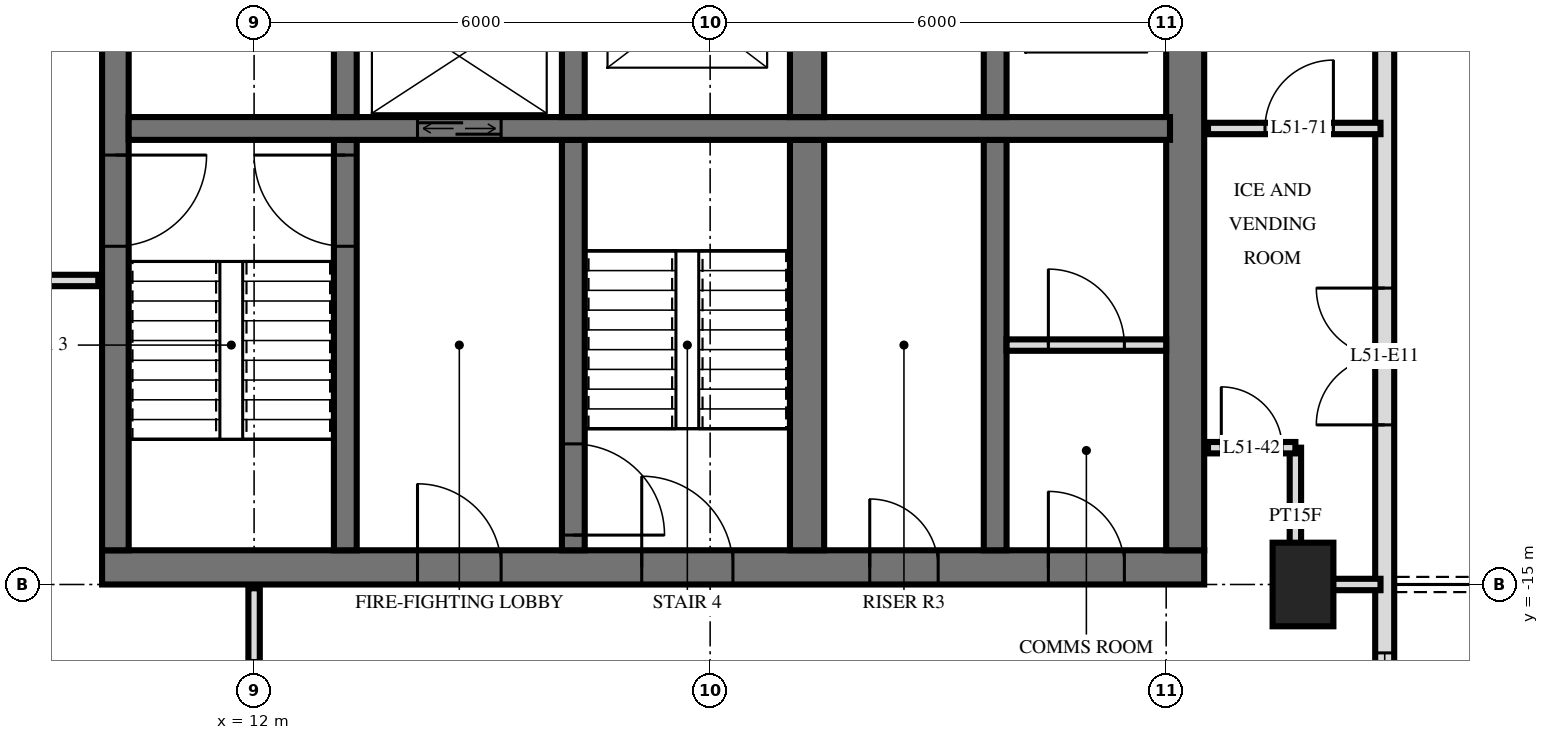
"""IFC4 building model, lengths in metres.
Left out: names, types, materials, properties, quantities, classifications, styles, units other than length and angle.
Written with IfcOpenShell. Run it as: python <this file> out.ifc"""

import sys

from ifc_helpers import new_model, si_unit, direction, frame, frame_2d, origin, origin_2d, place, context, subcontext, project, spatial, rectangle, extrude, element, fill, save


model = new_model("IFC4")
c1 = context("Model", 3, precision=1e-05, world=origin(), true_north=direction((0.0, 1.0)))
c2 = subcontext(c1, "Body", "Model", "MODEL_VIEW")
j1 = project(units=[si_unit("LENGTHUNIT", "METRE"), si_unit("PLANEANGLEUNIT", "RADIAN")], contexts=[c1])
p1 = place(None, origin())
s1 = spatial("IfcSite", under=j1, at=p1, CompositionType="ELEMENT")
p2 = place(p1, origin())
s2 = spatial("IfcBuilding", under=s1, at=p2, CompositionType="ELEMENT")
p3 = place(p2, frame((0.0, 0.0, 197.6)))
s3 = spatial("IfcBuildingStorey", under=s2, at=p3, CompositionType="ELEMENT", Elevation=197.6)
p4 = place(p3, frame((25.8, -15.0, 0.0), z_axis=(0.0, 0.0, 1.0), x_axis=(0.0, 1.0, 0.0)))
e1 = element("IfcColumn", 1, at=p4, inside=s3, PredefinedType="COLUMN", context=c2, shape_type="SweptSolid", body=[
    extrude(rectangle(XDim=1.1, YDim=0.8, at=origin_2d()), origin(), (0.0, 0.0, 1.0), 3.5),
])
p5 = place(p3, frame((10.0, -14.775, 0.0), z_axis=(0.0, 0.0, 1.0), x_axis=(1.0, 0.0, 0.0)))
e2 = element("IfcWall", 2, at=p5, inside=s3, PredefinedType="SHEAR", context=c2, shape_type="SweptSolid", body=[
    extrude(rectangle(XDim=14.5, YDim=0.45, at=frame_2d((7.25, 0.0))), origin(), (0.0, 0.0, 1.0), 3.5),
])
p6 = place(p5, frame((7.1, 0.0, 0.0)))
e3 = element("IfcOpeningElement", 3, at=p6, cuts=e2, PredefinedType="OPENING", context=c2, shape_type="SweptSolid", body=[
    extrude(rectangle(XDim=1.2, YDim=2.1, at=frame_2d((0.6, 1.05))), frame((0.0, 0.235, 0.0), z_axis=(0.0, -1.0, 0.0), x_axis=(1.0, 0.0, 0.0)), (0.0, 0.0, 1.0), 0.47),
])
p7 = place(p5, frame((4.15, 0.0, 0.0)))
e4 = element("IfcOpeningElement", 4, at=p7, cuts=e2, PredefinedType="OPENING", context=c2, shape_type="SweptSolid", body=[
    extrude(rectangle(XDim=1.1, YDim=2.1, at=frame_2d((0.55, 1.05))), frame((0.0, 0.235, 0.0), z_axis=(0.0, -1.0, 0.0), x_axis=(1.0, 0.0, 0.0)), (0.0, 0.0, 1.0), 0.47),
])
p8 = place(p5, frame((10.1, 0.0, 0.0)))
e5 = element("IfcOpeningElement", 5, at=p8, cuts=e2, PredefinedType="OPENING", context=c2, shape_type="SweptSolid", body=[
    extrude(rectangle(XDim=0.9, YDim=2.1, at=frame_2d((0.45, 1.05))), frame((0.0, 0.235, 0.0), z_axis=(0.0, -1.0, 0.0), x_axis=(1.0, 0.0, 0.0)), (0.0, 0.0, 1.0), 0.47),
])
p9 = place(p5, frame((12.45, 0.0, 0.0)))
e6 = element("IfcOpeningElement", 6, at=p9, cuts=e2, PredefinedType="OPENING", context=c2, shape_type="SweptSolid", body=[
    extrude(rectangle(XDim=1.0, YDim=2.1, at=frame_2d((0.5, 1.05))), frame((0.0, 0.235, 0.0), z_axis=(0.0, -1.0, 0.0), x_axis=(1.0, 0.0, 0.0)), (0.0, 0.0, 1.0), 0.47),
])
p10 = place(p3, frame((10.175, -14.55, 0.0), z_axis=(0.0, 0.0, 1.0), x_axis=(0.0, 1.0, 0.0)))
e7 = element("IfcWall", 7, at=p10, inside=s3, PredefinedType="SHEAR", context=c2, shape_type="SweptSolid", body=[
    extrude(rectangle(XDim=14.1, YDim=0.35, at=frame_2d((7.05, 0.0))), origin(), (0.0, 0.0, 1.0), 3.5),
])
p11 = place(p10, frame((8.4, 0.0, 0.0)))
e8 = element("IfcOpeningElement", 8, at=p11, cuts=e7, PredefinedType="OPENING", context=c2, shape_type="SweptSolid", body=[
    extrude(rectangle(XDim=1.4, YDim=2.4, at=frame_2d((0.7, 1.2))), frame((0.0, 0.185, 0.0), z_axis=(0.0, -1.0, 0.0), x_axis=(1.0, 0.0, 0.0)), (0.0, 0.0, 1.0), 0.37),
])
p12 = place(p10, frame((10.0, 0.0, 0.0)))
e9 = element("IfcOpeningElement", 9, at=p12, cuts=e7, PredefinedType="OPENING", context=c2, shape_type="SweptSolid", body=[
    extrude(rectangle(XDim=1.4, YDim=2.4, at=frame_2d((0.7, 1.2))), frame((0.0, 0.185, 0.0), z_axis=(0.0, -1.0, 0.0), x_axis=(1.0, 0.0, 0.0)), (0.0, 0.0, 1.0), 0.37),
])
p13 = place(p10, frame((4.0, 0.0, 0.0)))
e10 = element("IfcOpeningElement", 10, at=p13, cuts=e7, PredefinedType="OPENING", context=c2, shape_type="SweptSolid", body=[
    extrude(rectangle(XDim=1.2, YDim=2.1, at=frame_2d((0.6, 1.05))), frame((0.0, 0.185, 0.0), z_axis=(0.0, -1.0, 0.0), x_axis=(1.0, 0.0, 0.0)), (0.0, 0.0, 1.0), 0.37),
])
p14 = place(p3, frame((24.25, -14.55, 0.0), z_axis=(0.0, 0.0, 1.0), x_axis=(0.0, 1.0, 0.0)))
e11 = element("IfcWall", 11, at=p14, inside=s3, PredefinedType="SHEAR", context=c2, shape_type="SweptSolid", body=[
    extrude(rectangle(XDim=14.1, YDim=0.5, at=frame_2d((7.05, 0.0))), origin(), (0.0, 0.0, 1.0), 3.5),
])
p15 = place(p3, frame((10.35, -9.0, 0.0), z_axis=(0.0, 0.0, 1.0), x_axis=(1.0, 0.0, 0.0)))
e12 = element("IfcWall", 12, at=p15, inside=s3, PredefinedType="SHEAR", context=c2, shape_type="SweptSolid", body=[
    extrude(rectangle(XDim=13.7, YDim=0.3, at=frame_2d((6.85, 0.0))), origin(), (0.0, 0.0, 1.0), 3.5),
])
p16 = place(p15, frame((3.8, 0.0, 0.0)))
e13 = element("IfcOpeningElement", 13, at=p16, cuts=e12, PredefinedType="OPENING", context=c2, shape_type="SweptSolid", body=[
    extrude(rectangle(XDim=1.1, YDim=2.1, at=frame_2d((0.55, 1.05))), frame((0.0, 0.16, 0.0), z_axis=(0.0, -1.0, 0.0), x_axis=(1.0, 0.0, 0.0)), (0.0, 0.0, 1.0), 0.32),
])
p17 = place(p3, frame((13.2, -8.85, 0.0), z_axis=(0.0, 0.0, 1.0), x_axis=(0.0, 1.0, 0.0)))
e14 = element("IfcWall", 14, at=p17, inside=s3, PredefinedType="SHEAR", context=c2, shape_type="SweptSolid", body=[
    extrude(rectangle(XDim=2.3, YDim=0.3, at=frame_2d((1.15, 0.0))), origin(), (0.0, 0.0, 1.0), 3.5),
])
p18 = place(p3, frame((13.2, -14.55, 0.0), z_axis=(0.0, 0.0, 1.0), x_axis=(0.0, 1.0, 0.0)))
e15 = element("IfcWall", 15, at=p18, inside=s3, PredefinedType="SHEAR", context=c2, shape_type="SweptSolid", body=[
    extrude(rectangle(XDim=5.4, YDim=0.3, at=frame_2d((2.7, 0.0))), origin(), (0.0, 0.0, 1.0), 3.5),
])
p19 = place(p18, frame((4.0, 0.0, 0.0)))
e16 = element("IfcOpeningElement", 16, at=p19, cuts=e15, PredefinedType="OPENING", context=c2, shape_type="SweptSolid", body=[
    extrude(rectangle(XDim=1.2, YDim=2.1, at=frame_2d((0.6, 1.05))), frame((0.0, 0.16, 0.0), z_axis=(0.0, -1.0, 0.0), x_axis=(1.0, 0.0, 0.0)), (0.0, 0.0, 1.0), 0.32),
])
p20 = place(p3, frame((16.2, -8.85, 0.0), z_axis=(0.0, 0.0, 1.0), x_axis=(0.0, 1.0, 0.0)))
e17 = element("IfcWall", 17, at=p20, inside=s3, PredefinedType="SHEAR", context=c2, shape_type="SweptSolid", body=[
    extrude(rectangle(XDim=2.3, YDim=0.3, at=frame_2d((1.15, 0.0))), origin(), (0.0, 0.0, 1.0), 3.5),
])
p21 = place(p3, frame((16.2, -14.55, 0.0), z_axis=(0.0, 0.0, 1.0), x_axis=(0.0, 1.0, 0.0)))
e18 = element("IfcWall", 18, at=p21, inside=s3, PredefinedType="SHEAR", context=c2, shape_type="SweptSolid", body=[
    extrude(rectangle(XDim=5.4, YDim=0.3, at=frame_2d((2.7, 0.0))), origin(), (0.0, 0.0, 1.0), 3.5),
])
p22 = place(p21, frame((0.2, 0.0, 0.0)))
e19 = element("IfcOpeningElement", 19, at=p22, cuts=e18, PredefinedType="OPENING", context=c2, shape_type="SweptSolid", body=[
    extrude(rectangle(XDim=1.2, YDim=2.1, at=frame_2d((0.6, 1.05))), frame((0.0, 0.16, 0.0), z_axis=(0.0, -1.0, 0.0), x_axis=(1.0, 0.0, 0.0)), (0.0, 0.0, 1.0), 0.32),
])
p23 = place(p3, frame((19.275, -8.85, 0.0), z_axis=(0.0, 0.0, 1.0), x_axis=(0.0, 1.0, 0.0)))
e20 = element("IfcWall", 20, at=p23, inside=s3, PredefinedType="SHEAR", context=c2, shape_type="SweptSolid", body=[
    extrude(rectangle(XDim=2.3, YDim=0.45, at=frame_2d((1.15, 0.0))), origin(), (0.0, 0.0, 1.0), 3.5),
])
p24 = place(p3, frame((19.275, -14.55, 0.0), z_axis=(0.0, 0.0, 1.0), x_axis=(0.0, 1.0, 0.0)))
e21 = element("IfcWall", 21, at=p24, inside=s3, PredefinedType="SHEAR", context=c2, shape_type="SweptSolid", body=[
    extrude(rectangle(XDim=5.4, YDim=0.45, at=frame_2d((2.7, 0.0))), origin(), (0.0, 0.0, 1.0), 3.5),
])
p25 = place(p3, frame((21.75, -8.85, 0.0), z_axis=(0.0, 0.0, 1.0), x_axis=(0.0, 1.0, 0.0)))
e22 = element("IfcWall", 22, at=p25, inside=s3, PredefinedType="SHEAR", context=c2, shape_type="SweptSolid", body=[
    extrude(rectangle(XDim=2.3, YDim=0.3, at=frame_2d((1.15, 0.0))), origin(), (0.0, 0.0, 1.0), 3.5),
])
p26 = place(p3, frame((21.75, -14.55, 0.0), z_axis=(0.0, 0.0, 1.0), x_axis=(0.0, 1.0, 0.0)))
e23 = element("IfcWall", 23, at=p26, inside=s3, PredefinedType="SHEAR", context=c2, shape_type="SweptSolid", body=[
    extrude(rectangle(XDim=5.4, YDim=0.3, at=frame_2d((2.7, 0.0))), origin(), (0.0, 0.0, 1.0), 3.5),
])
p27 = place(p3, frame((26.875, -24.875, 0.0), z_axis=(0.0, 0.0, 1.0), x_axis=(0.0, 1.0, 0.0)))
e24 = element("IfcWall", 24, at=p27, inside=s3, PredefinedType="SOLIDWALL", context=c2, shape_type="SweptSolid", body=[
    extrude(rectangle(XDim=21.551, YDim=0.25, at=frame_2d((10.775, 0.0))), origin(), (0.0, 0.0, 1.0), 3.22),
])
p28 = place(p27, frame((0.425, 0.0, 0.0)))
e25 = element("IfcOpeningElement", 25, at=p28, cuts=e24, PredefinedType="OPENING", context=c2, shape_type="SweptSolid", body=[
    extrude(rectangle(XDim=1.8, YDim=2.4, at=frame_2d((0.9, 1.2))), frame((0.0, 0.135, 0.0), z_axis=(0.0, -1.0, 0.0), x_axis=(1.0, 0.0, 0.0)), (0.0, 0.0, 1.0), 0.27),
])
p29 = place(p27, frame((3.875, 0.0, 0.0)))
e26 = element("IfcOpeningElement", 26, at=p29, cuts=e24, PredefinedType="OPENING", context=c2, shape_type="SweptSolid", body=[
    extrude(rectangle(XDim=1.8, YDim=2.4, at=frame_2d((0.9, 1.2))), frame((0.0, 0.135, 0.0), z_axis=(0.0, -1.0, 0.0), x_axis=(1.0, 0.0, 0.0)), (0.0, 0.0, 1.0), 0.27),
])
p30 = place(p27, frame((7.775, 0.0, 0.9)))
e27 = element("IfcOpeningElement", 27, at=p30, cuts=e24, PredefinedType="OPENING", context=c2, shape_type="SweptSolid", body=[
    extrude(rectangle(XDim=1.2, YDim=1.5, at=frame_2d((0.6, 0.75))), frame((0.0, 0.135, 0.0), z_axis=(0.0, -1.0, 0.0), x_axis=(1.0, 0.0, 0.0)), (0.0, 0.0, 1.0), 0.27),
])
p31 = place(p27, frame((11.975, 0.0, 0.0)))
e28 = element("IfcOpeningElement", 28, at=p31, cuts=e24, PredefinedType="OPENING", context=c2, shape_type="SweptSolid", body=[
    extrude(rectangle(XDim=1.8, YDim=2.4, at=frame_2d((0.9, 1.2))), frame((0.0, 0.135, 0.0), z_axis=(0.0, -1.0, 0.0), x_axis=(1.0, 0.0, 0.0)), (0.0, 0.0, 1.0), 0.27),
])
p32 = place(p3, frame((21.9, -11.85, 0.0), z_axis=(0.0, 0.0, 1.0), x_axis=(1.0, 0.0, 0.0)))
e29 = element("IfcWall", 29, at=p32, inside=s3, PredefinedType="PARTITIONING", context=c2, shape_type="SweptSolid", body=[
    extrude(rectangle(XDim=2.1, YDim=0.15, at=frame_2d((1.05, 0.0))), origin(), (0.0, 0.0, 1.0), 3.2),
])
p33 = place(p32, frame((0.55, 0.0, 0.0)))
e30 = element("IfcOpeningElement", 30, at=p33, cuts=e29, PredefinedType="OPENING", context=c2, shape_type="SweptSolid", body=[
    extrude(rectangle(XDim=1.0, YDim=2.1, at=frame_2d((0.5, 1.05))), frame((0.0, 0.085, 0.0), z_axis=(0.0, -1.0, 0.0), x_axis=(1.0, 0.0, 0.0)), (0.0, 0.0, 1.0), 0.17),
])
p34 = place(p3, frame((25.7, -15.0, 0.0), z_axis=(0.0, 0.0, 1.0), x_axis=(0.0, 1.0, 0.0)))
e31 = element("IfcWall", 31, at=p34, inside=s3, PredefinedType="PARTITIONING", context=c2, shape_type="SweptSolid", body=[
    extrude(rectangle(XDim=1.8, YDim=0.15, at=frame_2d((0.9, 0.0))), origin(), (0.0, 0.0, 1.0), 3.22),
])
p35 = place(p3, frame((12.0, -18.0, 0.0), z_axis=(0.0, 0.0, 1.0), x_axis=(0.0, 1.0, 0.0)))
e32 = element("IfcWall", 32, at=p35, inside=s3, PredefinedType="PARTITIONING", context=c2, shape_type="SweptSolid", body=[
    extrude(rectangle(XDim=2.95, YDim=0.15, at=frame_2d((1.475, 0.0))), origin(), (0.0, 0.0, 1.0), 3.22),
])
p36 = place(p35, frame((1.0, 0.0, 0.0)))
e33 = element("IfcOpeningElement", 33, at=p36, cuts=e32, PredefinedType="OPENING", context=c2, shape_type="SweptSolid", body=[
    extrude(rectangle(XDim=1.0, YDim=2.1, at=frame_2d((0.5, 1.05))), frame((0.0, 0.085, 0.0), z_axis=(0.0, -1.0, 0.0), x_axis=(1.0, 0.0, 0.0)), (0.0, 0.0, 1.0), 0.17),
])
p37 = place(p3, frame((25.7, -15.0, 0.0), z_axis=(0.0, 0.0, 1.0), x_axis=(1.0, 0.0, 0.0)))
e34 = element("IfcWall", 34, at=p37, inside=s3, PredefinedType="PARTITIONING", context=c2, shape_type="SweptSolid", body=[
    extrude(rectangle(XDim=1.12, YDim=0.15, at=frame_2d((0.56, 0.0))), origin(), (0.0, 0.0, 1.0), 3.22),
])
p38 = place(p3, frame((24.55, -13.2, 0.0), z_axis=(0.0, 0.0, 1.0), x_axis=(1.0, 0.0, 0.0)))
e35 = element("IfcWall", 35, at=p38, inside=s3, PredefinedType="PARTITIONING", context=c2, shape_type="SweptSolid", body=[
    extrude(rectangle(XDim=1.15, YDim=0.15, at=frame_2d((0.575, 0.0))), origin(), (0.0, 0.0, 1.0), 3.22),
])
p39 = place(p38, frame((0.175, 0.0, 0.0)))
e36 = element("IfcOpeningElement", 36, at=p39, cuts=e35, PredefinedType="OPENING", context=c2, shape_type="SweptSolid", body=[
    extrude(rectangle(XDim=0.8, YDim=2.1, at=frame_2d((0.4, 1.05))), frame((0.0, 0.085, 0.0), z_axis=(0.0, -1.0, 0.0), x_axis=(1.0, 0.0, 0.0)), (0.0, 0.0, 1.0), 0.17),
])
p40 = place(p3, frame((-9.95, -11.0, 0.0), z_axis=(0.0, 0.0, 1.0), x_axis=(1.0, 0.0, 0.0)))
e37 = element("IfcWall", 37, at=p40, inside=s3, PredefinedType="PARTITIONING", context=c2, shape_type="SweptSolid", body=[
    extrude(rectangle(XDim=19.9, YDim=0.15, at=frame_2d((9.95, 0.0))), origin(), (0.0, 0.0, 1.0), 3.22),
])
p41 = place(p40, frame((9.45, 0.0, 0.0)))
e38 = element("IfcOpeningElement", 38, at=p41, cuts=e37, PredefinedType="OPENING", context=c2, shape_type="SweptSolid", body=[
    extrude(rectangle(XDim=1.0, YDim=2.1, at=frame_2d((0.5, 1.05))), frame((0.0, 0.085, 0.0), z_axis=(0.0, -1.0, 0.0), x_axis=(1.0, 0.0, 0.0)), (0.0, 0.0, 1.0), 0.17),
])
p42 = place(p40, frame((3.45, 0.0, 0.0)))
e39 = element("IfcOpeningElement", 39, at=p42, cuts=e37, PredefinedType="OPENING", context=c2, shape_type="SweptSolid", body=[
    extrude(rectangle(XDim=1.0, YDim=2.1, at=frame_2d((0.5, 1.05))), frame((0.0, 0.085, 0.0), z_axis=(0.0, -1.0, 0.0), x_axis=(1.0, 0.0, 0.0)), (0.0, 0.0, 1.0), 0.17),
])
p43 = place(p3, frame((24.55, -9.0, 0.0), z_axis=(0.0, 0.0, 1.0), x_axis=(1.0, 0.0, 0.0)))
e40 = element("IfcWall", 40, at=p43, inside=s3, PredefinedType="PARTITIONING", context=c2, shape_type="SweptSolid", body=[
    extrude(rectangle(XDim=2.27, YDim=0.15, at=frame_2d((1.135, 0.0))), origin(), (0.0, 0.0, 1.0), 3.22),
])
p44 = place(p43, frame((0.75, 0.0, 0.0)))
e41 = element("IfcOpeningElement", 41, at=p44, cuts=e40, PredefinedType="OPENING", context=c2, shape_type="SweptSolid", body=[
    extrude(rectangle(XDim=0.9, YDim=2.1, at=frame_2d((0.45, 1.05))), frame((0.0, 0.085, 0.0), z_axis=(0.0, -1.0, 0.0), x_axis=(1.0, 0.0, 0.0)), (0.0, 0.0, 1.0), 0.17),
])
p45 = place(p30, origin())
e42 = element("IfcWindow", 42, at=p45, inside=s3, PartitioningType="SINGLE_PANEL", PredefinedType="WINDOW", context=c2, shape_type="SweptSolid", body=[
    extrude(rectangle(XDim=1.2, YDim=1.5, at=frame_2d((0.6, 0.75))), frame((0.0, 0.03, 0.0), z_axis=(0.0, -1.0, 0.0), x_axis=(1.0, 0.0, 0.0)), (0.0, 0.0, 1.0), 0.06),
])
fill(e27, e42)
p46 = place(p31, origin())
e43 = element("IfcDoor", 43, at=p46, inside=s3, OperationType="DOUBLE_DOOR_SINGLE_SWING", PredefinedType="DOOR", context=c2, shape_type="SweptSolid", body=[
    extrude(rectangle(XDim=1.8, YDim=2.4, at=frame_2d((0.9, 1.2))), frame((0.0, 0.025, 0.0), z_axis=(0.0, -1.0, 0.0), x_axis=(1.0, 0.0, 0.0)), (0.0, 0.0, 1.0), 0.05),
])
fill(e28, e43)
p47 = place(p16, origin())
e44 = element("IfcDoor", 44, at=p47, inside=s3, OperationType="DOUBLE_DOOR_SLIDING", PredefinedType="USERDEFINED", context=c2, shape_type="SweptSolid", body=[
    extrude(rectangle(XDim=1.1, YDim=2.1, at=frame_2d((0.55, 1.05))), frame((0.0, 0.025, 0.0), z_axis=(0.0, -1.0, 0.0), x_axis=(1.0, 0.0, 0.0)), (0.0, 0.0, 1.0), 0.05),
])
fill(e13, e44)
p48 = place(p13, frame((0.6, 0.0, 0.0), z_axis=(0.0, 0.0, 1.0), x_axis=(-1.0, 0.0, 0.0)))
e45 = element("IfcDoor", 45, at=p48, inside=s3, OperationType="SINGLE_SWING_RIGHT", PredefinedType="DOOR", context=c2, shape_type="SweptSolid", body=[
    extrude(rectangle(XDim=1.2, YDim=2.1, at=frame_2d((0.0, 1.05))), frame((0.0, -0.025, 0.0), z_axis=(0.0, 1.0, 0.0), x_axis=(-1.0, 0.0, 0.0)), (0.0, 0.0, 1.0), 0.05),
])
fill(e10, e45)
p49 = place(p6, origin())
e46 = element("IfcDoor", 46, at=p49, inside=s3, OperationType="SINGLE_SWING_RIGHT", PredefinedType="DOOR", context=c2, shape_type="SweptSolid", body=[
    extrude(rectangle(XDim=1.2, YDim=2.1, at=frame_2d((0.6, 1.05))), frame((0.0, 0.025, 0.0), z_axis=(0.0, -1.0, 0.0), x_axis=(1.0, 0.0, 0.0)), (0.0, 0.0, 1.0), 0.05),
])
fill(e3, e46)
p50 = place(p7, origin())
e47 = element("IfcDoor", 47, at=p50, inside=s3, OperationType="SINGLE_SWING_RIGHT", PredefinedType="DOOR", context=c2, shape_type="SweptSolid", body=[
    extrude(rectangle(XDim=1.1, YDim=2.1, at=frame_2d((0.55, 1.05))), frame((0.0, 0.025, 0.0), z_axis=(0.0, -1.0, 0.0), x_axis=(1.0, 0.0, 0.0)), (0.0, 0.0, 1.0), 0.05),
])
fill(e4, e47)
p51 = place(p8, origin())
e48 = element("IfcDoor", 48, at=p51, inside=s3, OperationType="SINGLE_SWING_RIGHT", PredefinedType="DOOR", context=c2, shape_type="SweptSolid", body=[
    extrude(rectangle(XDim=0.9, YDim=2.1, at=frame_2d((0.45, 1.05))), frame((0.0, 0.025, 0.0), z_axis=(0.0, -1.0, 0.0), x_axis=(1.0, 0.0, 0.0)), (0.0, 0.0, 1.0), 0.05),
])
fill(e5, e48)
p52 = place(p9, origin())
e49 = element("IfcDoor", 49, at=p52, inside=s3, OperationType="SINGLE_SWING_RIGHT", PredefinedType="DOOR", context=c2, shape_type="SweptSolid", body=[
    extrude(rectangle(XDim=1.0, YDim=2.1, at=frame_2d((0.5, 1.05))), frame((0.0, 0.025, 0.0), z_axis=(0.0, -1.0, 0.0), x_axis=(1.0, 0.0, 0.0)), (0.0, 0.0, 1.0), 0.05),
])
fill(e6, e49)
p53 = place(p19, origin())
e50 = element("IfcDoor", 50, at=p53, inside=s3, OperationType="SINGLE_SWING_LEFT", PredefinedType="DOOR", context=c2, shape_type="SweptSolid", body=[
    extrude(rectangle(XDim=1.2, YDim=2.1, at=frame_2d((0.6, 1.05))), frame((0.0, 0.025, 0.0), z_axis=(0.0, -1.0, 0.0), x_axis=(1.0, 0.0, 0.0)), (0.0, 0.0, 1.0), 0.05),
])
fill(e16, e50)
p54 = place(p22, frame((0.6, 0.0, 0.0), z_axis=(0.0, 0.0, 1.0), x_axis=(-1.0, 0.0, 0.0)))
e51 = element("IfcDoor", 51, at=p54, inside=s3, OperationType="SINGLE_SWING_LEFT", PredefinedType="DOOR", context=c2, shape_type="SweptSolid", body=[
    extrude(rectangle(XDim=1.2, YDim=2.1, at=frame_2d((0.0, 1.05))), frame((0.0, -0.025, 0.0), z_axis=(0.0, 1.0, 0.0), x_axis=(-1.0, 0.0, 0.0)), (0.0, 0.0, 1.0), 0.05),
])
fill(e19, e51)
p55 = place(p33, origin())
e52 = element("IfcDoor", 52, at=p55, inside=s3, OperationType="SINGLE_SWING_RIGHT", PredefinedType="DOOR", context=c2, shape_type="SweptSolid", body=[
    extrude(rectangle(XDim=1.0, YDim=2.1, at=frame_2d((0.5, 1.05))), frame((0.0, 0.025, 0.0), z_axis=(0.0, -1.0, 0.0), x_axis=(1.0, 0.0, 0.0)), (0.0, 0.0, 1.0), 0.05),
])
fill(e30, e52)
p56 = place(p39, origin())
e53 = element("IfcDoor", 53, at=p56, inside=s3, OperationType="SINGLE_SWING_RIGHT", PredefinedType="DOOR", context=c2, shape_type="SweptSolid", body=[
    extrude(rectangle(XDim=0.8, YDim=2.1, at=frame_2d((0.4, 1.05))), frame((0.0, 0.025, 0.0), z_axis=(0.0, -1.0, 0.0), x_axis=(1.0, 0.0, 0.0)), (0.0, 0.0, 1.0), 0.05),
])
fill(e36, e53)
p57 = place(p44, origin())
e54 = element("IfcDoor", 54, at=p57, inside=s3, OperationType="SINGLE_SWING_LEFT", PredefinedType="DOOR", context=c2, shape_type="SweptSolid", body=[
    extrude(rectangle(XDim=0.9, YDim=2.1, at=frame_2d((0.45, 1.05))), frame((0.0, 0.025, 0.0), z_axis=(0.0, -1.0, 0.0), x_axis=(1.0, 0.0, 0.0)), (0.0, 0.0, 1.0), 0.05),
])
fill(e41, e54)
save(model, sys.argv[1])
